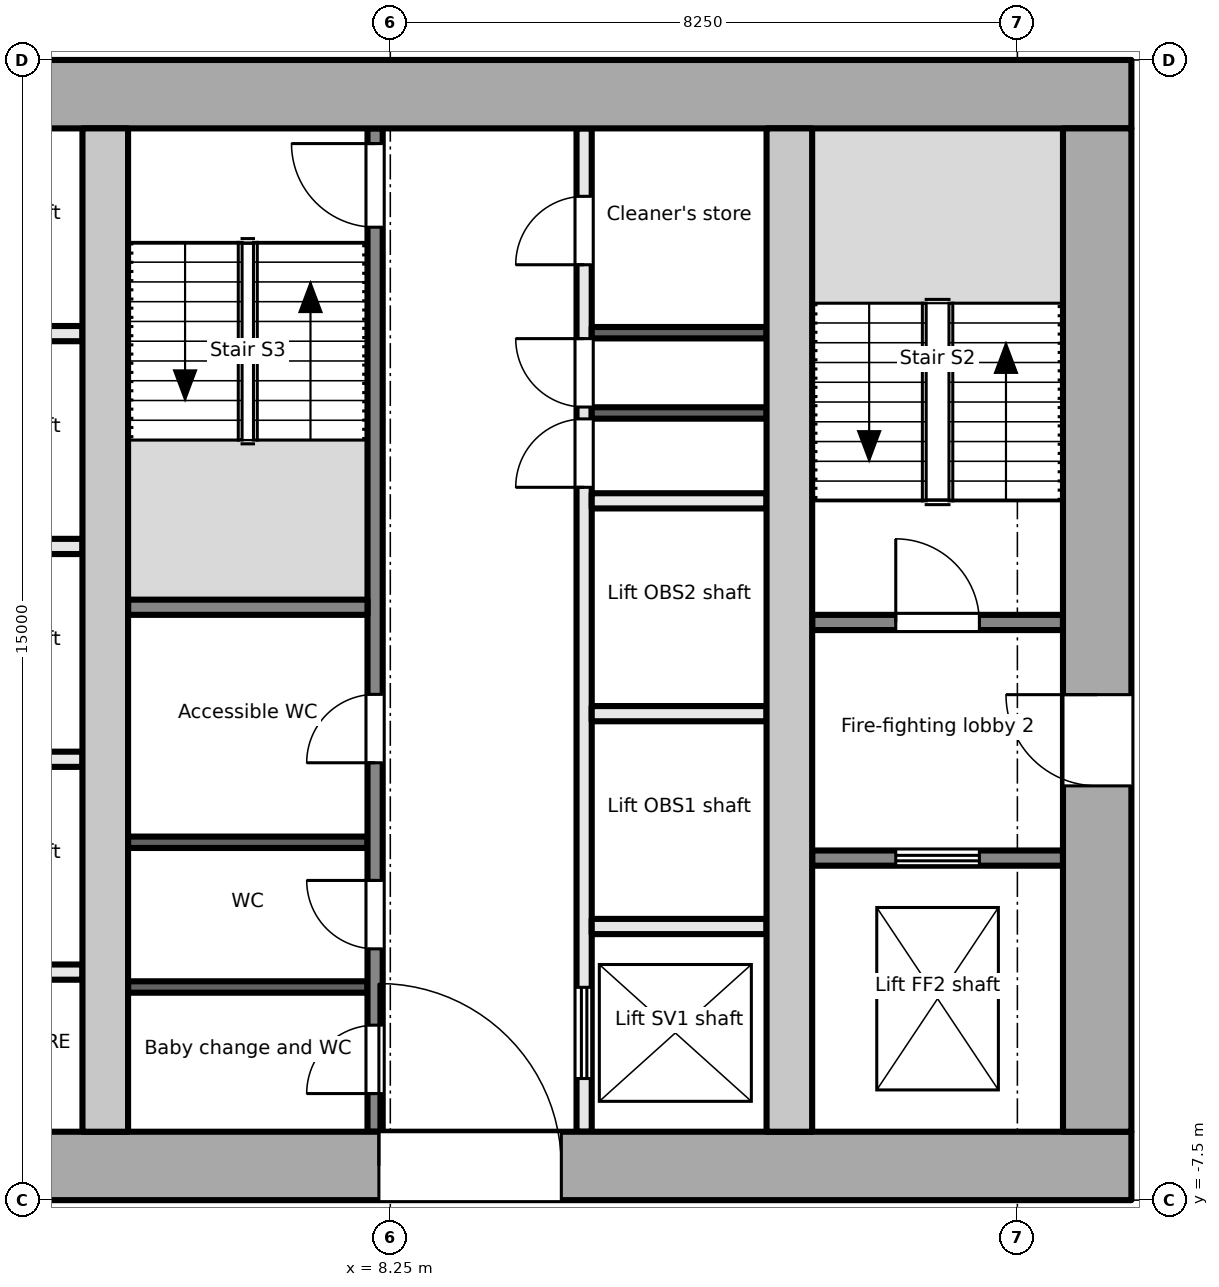
"""IFC4 building model, lengths in metres.
Left out: names, types, materials, properties, quantities, classifications, styles, units other than length and angle.
Written with IfcOpenShell. Run it as: python <this file> out.ifc"""

import sys

from ifc_helpers import new_model, si_unit, direction, frame, frame_2d, origin, place, context, subcontext, project, spatial, rectangle, extrude, element, fill, save


model = new_model("IFC4")
c1 = context("Model", 3, precision=1e-05, world=origin(), true_north=direction((0.0, 1.0)))
c2 = subcontext(c1, "Body", "Model", "MODEL_VIEW")
j1 = project(units=[si_unit("LENGTHUNIT", "METRE"), si_unit("PLANEANGLEUNIT", "RADIAN")], contexts=[c1])
p1 = place(None, origin())
s1 = spatial("IfcSite", under=j1, at=p1, CompositionType="ELEMENT")
p2 = place(p1, origin())
s2 = spatial("IfcBuilding", under=s1, at=p2, CompositionType="ELEMENT")
p3 = place(p2, frame((0.0, 0.0, 87.7)))
s3 = spatial("IfcBuildingStorey", under=s2, at=p3, CompositionType="ELEMENT", Elevation=87.7)
p4 = place(p3, frame((-18.0, -7.05, -0.2), z_axis=(0.0, 0.0, 1.0), x_axis=(1.0, 0.0, 0.0)))
e1 = element("IfcWall", 1, at=p4, inside=s3, PredefinedType="SHEAR", context=c2, shape_type="SweptSolid", body=[
    extrude(rectangle(XDim=36.0, YDim=0.9, at=frame_2d((18.0, 0.0))), origin(), (0.0, 0.0, 1.0), 4.0),
])
p5 = place(p4, frame((7.8, 0.0, 0.2)))
e2 = element("IfcOpeningElement", 2, at=p5, cuts=e1, PredefinedType="OPENING", context=c2, shape_type="SweptSolid", body=[
    extrude(rectangle(XDim=2.4, YDim=2.1, at=frame_2d((1.2, 1.05))), frame((0.0, 0.46, 0.0), z_axis=(0.0, -1.0, 0.0), x_axis=(1.0, 0.0, 0.0)), (0.0, 0.0, 1.0), 0.921),
])
p6 = place(p4, frame((17.4, 0.0, 0.2)))
e3 = element("IfcOpeningElement", 3, at=p6, cuts=e1, PredefinedType="OPENING", context=c2, shape_type="SweptSolid", body=[
    extrude(rectangle(XDim=1.2, YDim=2.1, at=frame_2d((0.6, 1.05))), frame((0.0, 0.46, 0.0), z_axis=(0.0, -1.0, 0.0), x_axis=(1.0, 0.0, 0.0)), (0.0, 0.0, 1.0), 0.921),
])
p7 = place(p4, frame((26.1, 0.0, 0.2)))
e4 = element("IfcOpeningElement", 4, at=p7, cuts=e1, PredefinedType="OPENING", context=c2, shape_type="SweptSolid", body=[
    extrude(rectangle(XDim=2.4, YDim=2.1, at=frame_2d((1.2, 1.05))), frame((0.0, 0.46, 0.0), z_axis=(0.0, -1.0, 0.0), x_axis=(1.0, 0.0, 0.0)), (0.0, 0.0, 1.0), 0.921),
])
p8 = place(p3, frame((-18.0, 7.05, -0.2), z_axis=(0.0, 0.0, 1.0), x_axis=(1.0, 0.0, 0.0)))
e5 = element("IfcWall", 5, at=p8, inside=s3, PredefinedType="SHEAR", context=c2, shape_type="SweptSolid", body=[
    extrude(rectangle(XDim=36.0, YDim=0.9, at=frame_2d((18.0, 0.0))), origin(), (0.0, 0.0, 1.0), 4.0),
])
p9 = place(p3, frame((17.55, -6.6, -0.2), z_axis=(0.0, 0.0, 1.0), x_axis=(0.0, 1.0, 0.0)))
e6 = element("IfcWall", 6, at=p9, inside=s3, PredefinedType="SHEAR", context=c2, shape_type="SweptSolid", body=[
    extrude(rectangle(XDim=13.2, YDim=0.9, at=frame_2d((6.6, 0.0))), origin(), (0.0, 0.0, 1.0), 4.0),
])
p10 = place(p9, frame((4.55, 0.0, 0.2)))
e7 = element("IfcOpeningElement", 7, at=p10, cuts=e6, PredefinedType="OPENING", context=c2, shape_type="SweptSolid", body=[
    extrude(rectangle(XDim=1.2, YDim=2.1, at=frame_2d((0.6, 1.05))), frame((0.0, 0.46, 0.0), z_axis=(0.0, -1.0, 0.0), x_axis=(1.0, 0.0, 0.0)), (0.0, 0.0, 1.0), 0.921),
])
for number, where, z_axis, x_axis in (
    (8, (4.5, -6.6, -0.2), (0.0, 0.0, 1.0), (0.0, 1.0, 0.0)),
    (9, (13.5, -6.6, -0.2), (0.0, 0.0, 1.0), (0.0, 1.0, 0.0)),
):
    element("IfcWall", number, at=place(p3, frame(where, z_axis=z_axis, x_axis=x_axis)), inside=s3, PredefinedType="SHEAR", context=c2, shape_type="SweptSolid", body=[
        extrude(rectangle(XDim=13.2, YDim=0.6, at=frame_2d((6.6, 0.0))), origin(), (0.0, 0.0, 1.0), 4.0),
    ])
p11 = place(p3, frame((13.8, -3.0, 0.0), z_axis=(0.0, 0.0, 1.0), x_axis=(1.0, 0.0, 0.0)))
e10 = element("IfcWall", 10, at=p11, inside=s3, PredefinedType="PARTITIONING", context=c2, shape_type="SweptSolid", body=[
    extrude(rectangle(XDim=3.3, YDim=0.2, at=frame_2d((1.65, 0.0))), origin(), (0.0, 0.0, 1.0), 3.8),
])
p12 = place(p11, frame((1.1, 0.0, 0.0)))
e11 = element("IfcOpeningElement", 11, at=p12, cuts=e10, PredefinedType="OPENING", context=c2, shape_type="SweptSolid", body=[
    extrude(rectangle(XDim=1.1, YDim=2.1, at=frame_2d((0.55, 1.05))), frame((0.0, 0.111, 0.0), z_axis=(0.0, -1.0, 0.0), x_axis=(1.0, 0.0, 0.0)), (0.0, 0.0, 1.0), 0.221),
])
p13 = place(p3, frame((13.8, 0.1, 0.0), z_axis=(0.0, 0.0, 1.0), x_axis=(1.0, 0.0, 0.0)))
e12 = element("IfcWall", 12, at=p13, inside=s3, PredefinedType="PARTITIONING", context=c2, shape_type="SweptSolid", body=[
    extrude(rectangle(XDim=3.3, YDim=0.2, at=frame_2d((1.65, 0.0))), origin(), (0.0, 0.0, 1.0), 3.8),
])
p14 = place(p13, frame((1.1, 0.0, 0.0)))
e13 = element("IfcOpeningElement", 13, at=p14, cuts=e12, PredefinedType="OPENING", context=c2, shape_type="SweptSolid", body=[
    extrude(rectangle(XDim=1.1, YDim=2.1, at=frame_2d((0.55, 1.05))), frame((0.0, 0.111, 0.0), z_axis=(0.0, -1.0, 0.0), x_axis=(1.0, 0.0, 0.0)), (0.0, 0.0, 1.0), 0.221),
])
for number, where, z_axis, x_axis in (
    (14, (1.9, -1.7, 0.0), (0.0, 0.0, 1.0), (1.0, 0.0, 0.0)),
    (15, (1.9, 1.1, 0.0), (0.0, 0.0, 1.0), (1.0, 0.0, 0.0)),
    (16, (1.9, 3.9, 0.0), (0.0, 0.0, 1.0), (1.0, 0.0, 0.0)),
    (17, (1.9, -4.5, 0.0), (0.0, 0.0, 1.0), (1.0, 0.0, 0.0)),
):
    element("IfcWall", number, at=place(p3, frame(where, z_axis=z_axis, x_axis=x_axis)), inside=s3, PredefinedType="PARTITIONING", context=c2, shape_type="SweptSolid", body=[
        extrude(rectangle(XDim=2.3, YDim=0.2, at=frame_2d((1.15, 0.0))), origin(), (0.0, 0.0, 1.0), 3.8),
    ])
p15 = place(p3, frame((8.05, -6.6, 0.0), z_axis=(0.0, 0.0, 1.0), x_axis=(0.0, 1.0, 0.0)))
e18 = element("IfcWall", 18, at=p15, inside=s3, PredefinedType="PARTITIONING", context=c2, shape_type="SweptSolid", body=[
    extrude(rectangle(XDim=13.2, YDim=0.2, at=frame_2d((6.6, 0.0))), origin(), (0.0, 0.0, 1.0), 3.8),
])
p16 = place(p15, frame((0.502, 0.0, 0.0)))
e19 = element("IfcOpeningElement", 19, at=p16, cuts=e18, PredefinedType="OPENING", context=c2, shape_type="SweptSolid", body=[
    extrude(rectangle(XDim=0.9, YDim=2.1, at=frame_2d((0.45, 1.05))), frame((0.0, 0.111, 0.0), z_axis=(0.0, -1.0, 0.0), x_axis=(1.0, 0.0, 0.0)), (0.0, 0.0, 1.0), 0.221),
])
p17 = place(p15, frame((2.406, 0.0, 0.0)))
e20 = element("IfcOpeningElement", 20, at=p17, cuts=e18, PredefinedType="OPENING", context=c2, shape_type="SweptSolid", body=[
    extrude(rectangle(XDim=0.9, YDim=2.1, at=frame_2d((0.45, 1.05))), frame((0.0, 0.111, 0.0), z_axis=(0.0, -1.0, 0.0), x_axis=(1.0, 0.0, 0.0)), (0.0, 0.0, 1.0), 0.221),
])
p18 = place(p15, frame((4.854, 0.0, 0.0)))
e21 = element("IfcOpeningElement", 21, at=p18, cuts=e18, PredefinedType="OPENING", context=c2, shape_type="SweptSolid", body=[
    extrude(rectangle(XDim=0.9, YDim=2.1, at=frame_2d((0.45, 1.05))), frame((0.0, 0.111, 0.0), z_axis=(0.0, -1.0, 0.0), x_axis=(1.0, 0.0, 0.0)), (0.0, 0.0, 1.0), 0.221),
])
p19 = place(p15, frame((11.9, 0.0, 0.0)))
e22 = element("IfcOpeningElement", 22, at=p19, cuts=e18, PredefinedType="OPENING", context=c2, shape_type="SweptSolid", body=[
    extrude(rectangle(XDim=1.1, YDim=2.1, at=frame_2d((0.55, 1.05))), frame((0.0, 0.111, 0.0), z_axis=(0.0, -1.0, 0.0), x_axis=(1.0, 0.0, 0.0)), (0.0, 0.0, 1.0), 0.221),
])
p20 = place(p3, frame((10.8, -6.6, 0.0), z_axis=(0.0, 0.0, 1.0), x_axis=(0.0, 1.0, 0.0)))
e23 = element("IfcWall", 23, at=p20, inside=s3, PredefinedType="PARTITIONING", context=c2, shape_type="SweptSolid", body=[
    extrude(rectangle(XDim=13.2, YDim=0.2, at=frame_2d((6.6, 0.0))), origin(), (0.0, 0.0, 1.0), 3.8),
])
p21 = place(p20, frame((0.7, 0.0, 0.0)))
e24 = element("IfcOpeningElement", 24, at=p21, cuts=e23, PredefinedType="OPENING", context=c2, shape_type="SweptSolid", body=[
    extrude(rectangle(XDim=1.2, YDim=2.1, at=frame_2d((0.6, 1.05))), frame((0.0, 0.111, 0.0), z_axis=(0.0, -1.0, 0.0), x_axis=(1.0, 0.0, 0.0)), (0.0, 0.0, 1.0), 0.221),
])
p22 = place(p20, frame((8.478, 0.0, 0.0)))
e25 = element("IfcOpeningElement", 25, at=p22, cuts=e23, PredefinedType="OPENING", context=c2, shape_type="SweptSolid", body=[
    extrude(rectangle(XDim=0.9, YDim=2.1, at=frame_2d((0.45, 1.05))), frame((0.0, 0.111, 0.0), z_axis=(0.0, -1.0, 0.0), x_axis=(1.0, 0.0, 0.0)), (0.0, 0.0, 1.0), 0.221),
])
p23 = place(p20, frame((9.534, 0.0, 0.0)))
e26 = element("IfcOpeningElement", 26, at=p23, cuts=e23, PredefinedType="OPENING", context=c2, shape_type="SweptSolid", body=[
    extrude(rectangle(XDim=0.9, YDim=2.1, at=frame_2d((0.45, 1.05))), frame((0.0, 0.111, 0.0), z_axis=(0.0, -1.0, 0.0), x_axis=(1.0, 0.0, 0.0)), (0.0, 0.0, 1.0), 0.221),
])
p24 = place(p20, frame((11.406, 0.0, 0.0)))
e27 = element("IfcOpeningElement", 27, at=p24, cuts=e23, PredefinedType="OPENING", context=c2, shape_type="SweptSolid", body=[
    extrude(rectangle(XDim=0.9, YDim=2.1, at=frame_2d((0.45, 1.05))), frame((0.0, 0.111, 0.0), z_axis=(0.0, -1.0, 0.0), x_axis=(1.0, 0.0, 0.0)), (0.0, 0.0, 1.0), 0.221),
])
p25 = place(p3, frame((4.8, 0.3, 0.0), z_axis=(0.0, 0.0, 1.0), x_axis=(1.0, 0.0, 0.0)))
e28 = element("IfcWall", 28, at=p25, inside=s3, PredefinedType="PARTITIONING", context=c2, shape_type="SweptSolid", body=[
    extrude(rectangle(XDim=3.15, YDim=0.2, at=frame_2d((1.575, 0.0))), origin(), (0.0, 0.0, 1.0), 3.8),
])
for number, where, z_axis, x_axis in (
    (29, (4.8, -4.696, 0.0), (0.0, 0.0, 1.0), (1.0, 0.0, 0.0)),
    (30, (4.8, -2.792, 0.0), (0.0, 0.0, 1.0), (1.0, 0.0, 0.0)),
):
    element("IfcWall", number, at=place(p3, frame(where, z_axis=z_axis, x_axis=x_axis)), inside=s3, PredefinedType="PARTITIONING", context=c2, shape_type="SweptSolid", body=[
        extrude(rectangle(XDim=3.15, YDim=0.15, at=frame_2d((1.575, 0.0))), origin(), (0.0, 0.0, 1.0), 3.8),
    ])
for number, where, z_axis, x_axis in (
    (31, (10.9, -3.9, 0.0), (0.0, 0.0, 1.0), (1.0, 0.0, 0.0)),
    (32, (10.9, -1.1, 0.0), (0.0, 0.0, 1.0), (1.0, 0.0, 0.0)),
    (33, (10.9, 1.7, 0.0), (0.0, 0.0, 1.0), (1.0, 0.0, 0.0)),
):
    element("IfcWall", number, at=place(p3, frame(where, z_axis=z_axis, x_axis=x_axis)), inside=s3, PredefinedType="PARTITIONING", context=c2, shape_type="SweptSolid", body=[
        extrude(rectangle(XDim=2.3, YDim=0.2, at=frame_2d((1.15, 0.0))), origin(), (0.0, 0.0, 1.0), 3.8),
    ])
for number, where, z_axis, x_axis in (
    (34, (10.9, 2.856, 0.0), (0.0, 0.0, 1.0), (1.0, 0.0, 0.0)),
    (35, (10.9, 3.912, 0.0), (0.0, 0.0, 1.0), (1.0, 0.0, 0.0)),
):
    element("IfcWall", number, at=place(p3, frame(where, z_axis=z_axis, x_axis=x_axis)), inside=s3, PredefinedType="PARTITIONING", context=c2, shape_type="SweptSolid", body=[
        extrude(rectangle(XDim=2.3, YDim=0.15, at=frame_2d((1.15, 0.0))), origin(), (0.0, 0.0, 1.0), 3.8),
    ])
p26 = place(p12, origin())
e36 = element("IfcDoor", 36, at=p26, inside=s3, OperationType="DOUBLE_DOOR_SLIDING", PredefinedType="DOOR", context=c2, shape_type="SweptSolid", body=[
    extrude(rectangle(XDim=1.1, YDim=2.1, at=frame_2d((0.55, 1.05))), frame((0.0, 0.025, 0.0), z_axis=(0.0, -1.0, 0.0), x_axis=(1.0, 0.0, 0.0)), (0.0, 0.0, 1.0), 0.05),
])
fill(e11, e36)
p27 = place(p10, origin())
e37 = element("IfcDoor", 37, at=p27, inside=s3, OperationType="SINGLE_SWING_RIGHT", PredefinedType="DOOR", context=c2, shape_type="SweptSolid", body=[
    extrude(rectangle(XDim=1.2, YDim=2.1, at=frame_2d((0.6, 1.05))), frame((0.0, 0.025, 0.0), z_axis=(0.0, -1.0, 0.0), x_axis=(1.0, 0.0, 0.0)), (0.0, 0.0, 1.0), 0.05),
])
fill(e7, e37)
p28 = place(p14, origin())
e38 = element("IfcDoor", 38, at=p28, inside=s3, OperationType="SINGLE_SWING_LEFT", PredefinedType="DOOR", context=c2, shape_type="SweptSolid", body=[
    extrude(rectangle(XDim=1.1, YDim=2.1, at=frame_2d((0.55, 1.05))), frame((0.0, 0.025, 0.0), z_axis=(0.0, -1.0, 0.0), x_axis=(1.0, 0.0, 0.0)), (0.0, 0.0, 1.0), 0.05),
])
fill(e13, e38)
p29 = place(p16, origin())
e39 = element("IfcDoor", 39, at=p29, inside=s3, OperationType="SINGLE_SWING_LEFT", PredefinedType="DOOR", context=c2, shape_type="SweptSolid", body=[
    extrude(rectangle(XDim=0.9, YDim=2.1, at=frame_2d((0.45, 1.05))), frame((0.0, 0.025, 0.0), z_axis=(0.0, -1.0, 0.0), x_axis=(1.0, 0.0, 0.0)), (0.0, 0.0, 1.0), 0.05),
])
fill(e19, e39)
p30 = place(p17, origin())
e40 = element("IfcDoor", 40, at=p30, inside=s3, OperationType="SINGLE_SWING_RIGHT", PredefinedType="DOOR", context=c2, shape_type="SweptSolid", body=[
    extrude(rectangle(XDim=0.9, YDim=2.1, at=frame_2d((0.45, 1.05))), frame((0.0, 0.025, 0.0), z_axis=(0.0, -1.0, 0.0), x_axis=(1.0, 0.0, 0.0)), (0.0, 0.0, 1.0), 0.05),
])
fill(e20, e40)
p31 = place(p18, origin())
e41 = element("IfcDoor", 41, at=p31, inside=s3, OperationType="SINGLE_SWING_LEFT", PredefinedType="DOOR", context=c2, shape_type="SweptSolid", body=[
    extrude(rectangle(XDim=0.9, YDim=2.1, at=frame_2d((0.45, 1.05))), frame((0.0, 0.025, 0.0), z_axis=(0.0, -1.0, 0.0), x_axis=(1.0, 0.0, 0.0)), (0.0, 0.0, 1.0), 0.05),
])
fill(e21, e41)
p32 = place(p19, origin())
e42 = element("IfcDoor", 42, at=p32, inside=s3, OperationType="SINGLE_SWING_RIGHT", PredefinedType="DOOR", context=c2, shape_type="SweptSolid", body=[
    extrude(rectangle(XDim=1.1, YDim=2.1, at=frame_2d((0.55, 1.05))), frame((0.0, 0.025, 0.0), z_axis=(0.0, -1.0, 0.0), x_axis=(1.0, 0.0, 0.0)), (0.0, 0.0, 1.0), 0.05),
])
fill(e22, e42)
p33 = place(p7, origin())
e43 = element("IfcDoor", 43, at=p33, inside=s3, OperationType="DOUBLE_DOOR_DOUBLE_SWING", PredefinedType="DOOR", context=c2, shape_type="SweptSolid", body=[
    extrude(rectangle(XDim=2.4, YDim=2.1, at=frame_2d((1.2, 1.05))), frame((0.0, 0.025, 0.0), z_axis=(0.0, -1.0, 0.0), x_axis=(1.0, 0.0, 0.0)), (0.0, 0.0, 1.0), 0.05),
])
fill(e4, e43)
p34 = place(p21, origin())
e44 = element("IfcDoor", 44, at=p34, inside=s3, OperationType="DOUBLE_DOOR_SLIDING", PredefinedType="DOOR", context=c2, shape_type="SweptSolid", body=[
    extrude(rectangle(XDim=1.2, YDim=2.1, at=frame_2d((0.6, 1.05))), frame((0.0, 0.025, 0.0), z_axis=(0.0, -1.0, 0.0), x_axis=(1.0, 0.0, 0.0)), (0.0, 0.0, 1.0), 0.05),
])
fill(e24, e44)
p35 = place(p22, origin())
e45 = element("IfcDoor", 45, at=p35, inside=s3, OperationType="SINGLE_SWING_LEFT", PredefinedType="DOOR", context=c2, shape_type="SweptSolid", body=[
    extrude(rectangle(XDim=0.9, YDim=2.1, at=frame_2d((0.45, 1.05))), frame((0.0, 0.025, 0.0), z_axis=(0.0, -1.0, 0.0), x_axis=(1.0, 0.0, 0.0)), (0.0, 0.0, 1.0), 0.05),
])
fill(e25, e45)
p36 = place(p23, origin())
e46 = element("IfcDoor", 46, at=p36, inside=s3, OperationType="SINGLE_SWING_RIGHT", PredefinedType="DOOR", context=c2, shape_type="SweptSolid", body=[
    extrude(rectangle(XDim=0.9, YDim=2.1, at=frame_2d((0.45, 1.05))), frame((0.0, 0.025, 0.0), z_axis=(0.0, -1.0, 0.0), x_axis=(1.0, 0.0, 0.0)), (0.0, 0.0, 1.0), 0.05),
])
fill(e26, e46)
p37 = place(p24, origin())
e47 = element("IfcDoor", 47, at=p37, inside=s3, OperationType="SINGLE_SWING_LEFT", PredefinedType="DOOR", context=c2, shape_type="SweptSolid", body=[
    extrude(rectangle(XDim=0.9, YDim=2.1, at=frame_2d((0.45, 1.05))), frame((0.0, 0.025, 0.0), z_axis=(0.0, -1.0, 0.0), x_axis=(1.0, 0.0, 0.0)), (0.0, 0.0, 1.0), 0.05),
])
fill(e27, e47)
save(model, sys.argv[1])
